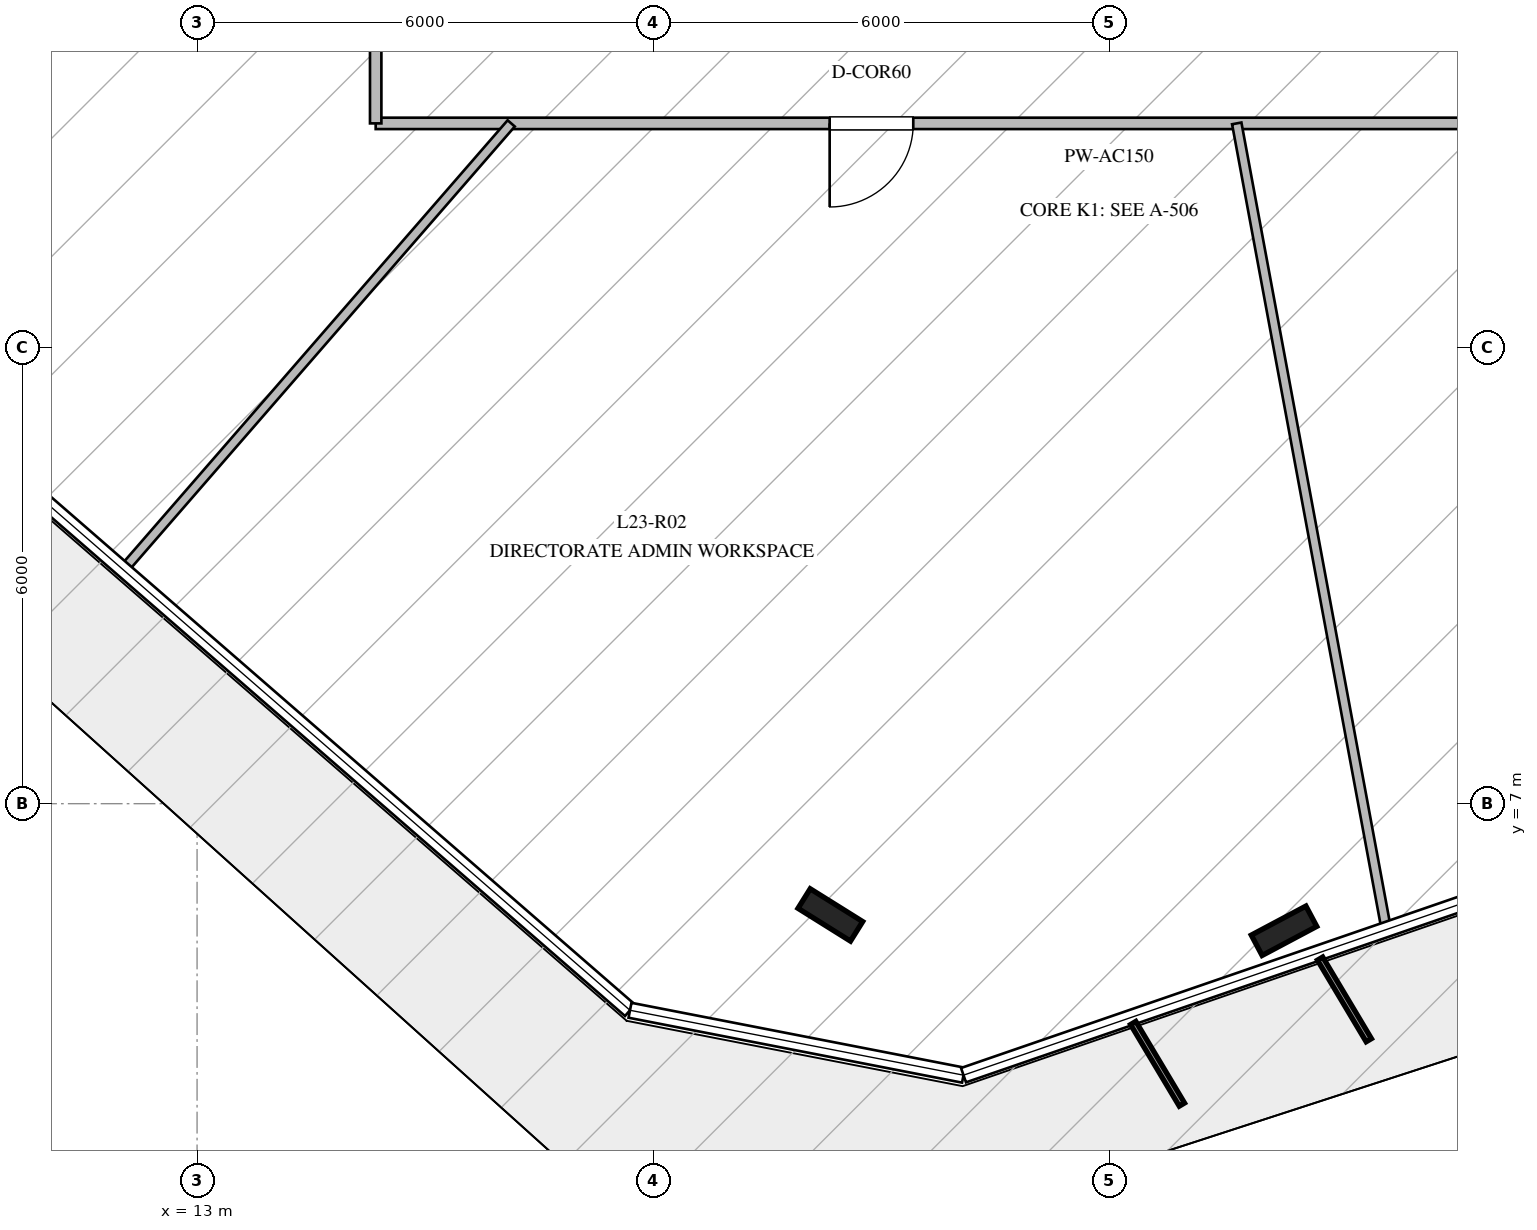
"""IFC4 building model, lengths in metres.
Left out: names, types, materials, properties, quantities, classifications, styles, units other than length and angle.
Written with IfcOpenShell. Run it as: python <this file> out.ifc"""

import sys

from ifc_helpers import new_model, si_unit, direction, frame, frame_2d, origin, origin_2d, place, context, subcontext, project, spatial, rectangle, i_section, extrude, element, fill, save


model = new_model("IFC4")
c1 = context("Model", 3, precision=1e-05, world=origin(), true_north=direction((0.0, 1.0)))
c2 = subcontext(c1, "Body", "Model", "MODEL_VIEW")
j1 = project(units=[si_unit("LENGTHUNIT", "METRE"), si_unit("PLANEANGLEUNIT", "RADIAN")], contexts=[c1])
p1 = place(None, origin())
s1 = spatial("IfcSite", under=j1, at=p1, CompositionType="ELEMENT")
p2 = place(p1, origin())
s2 = spatial("IfcBuilding", under=s1, at=p2, CompositionType="ELEMENT")
p3 = place(p2, frame((0.0, 0.0, 97.4)))
s3 = spatial("IfcBuildingStorey", under=s2, at=p3, CompositionType="ELEMENT", Elevation=97.4)
for number, where, z_axis, x_axis in (
    (1, (21.332, 5.536, -0.27), (0.0, 0.0, 1.0), (-0.848, 0.53, 0.0)),
    (2, (27.301, 5.328, -0.27), (0.0, 0.0, 1.0), (0.883, 0.469, 0.0)),
):
    element("IfcColumn", number, at=place(p3, frame(where, z_axis=z_axis, x_axis=x_axis)), inside=s3, PredefinedType="COLUMN", context=c2, shape_type="SweptSolid", body=[
        extrude(i_section(OverallWidth=0.303, OverallDepth=0.814, WebThickness=0.021, FlangeThickness=0.04, at=origin_2d()), origin(), (0.0, 0.0, 1.0), 5.27),
    ])
p4 = place(p3, frame((34.65, 15.95, 0.0), z_axis=(0.0, 0.0, 1.0), x_axis=(-1.0, 0.0, 0.0)))
e3 = element("IfcWall", 3, at=p4, inside=s3, PredefinedType="PARTITIONING", context=c2, shape_type="SweptSolid", body=[
    extrude(rectangle(XDim=19.3, YDim=0.15, at=frame_2d((9.65, 0.0))), origin(), (0.0, 0.0, 1.0), 4.21),
])
p5 = place(p4, frame((12.227, 0.0, 0.0)))
e4 = element("IfcOpeningElement", 4, at=p5, cuts=e3, PredefinedType="OPENING", context=c2, shape_type="SweptSolid", body=[
    extrude(rectangle(XDim=1.1, YDim=2.2, at=frame_2d((0.55, 1.1))), frame((0.0, 0.085, 0.0), z_axis=(0.0, -1.0, 0.0), x_axis=(1.0, 0.0, 0.0)), (0.0, 0.0, 1.0), 0.17),
])
p6 = place(p3, frame((15.35, 15.95, 0.0), z_axis=(0.0, 0.0, 1.0), x_axis=(0.0, 1.0, 0.0)))
e5 = element("IfcWall", 5, at=p6, inside=s3, PredefinedType="PARTITIONING", context=c2, shape_type="SweptSolid", body=[
    extrude(rectangle(XDim=18.1, YDim=0.15, at=frame_2d((9.05, 0.0))), origin(), (0.0, 0.0, 1.0), 4.21),
])
p7 = place(p6, frame((5.012, 0.0, 0.0)))
e6 = element("IfcOpeningElement", 6, at=p7, cuts=e5, PredefinedType="OPENING", context=c2, shape_type="SweptSolid", body=[
    extrude(rectangle(XDim=1.1, YDim=2.2, at=frame_2d((0.55, 1.1))), frame((0.0, 0.085, 0.0), z_axis=(0.0, -1.0, 0.0), x_axis=(1.0, 0.0, 0.0)), (0.0, 0.0, 1.0), 0.17),
])
p8 = place(p3, frame((17.133, 15.95, 0.0), z_axis=(0.0, 0.0, 1.0), x_axis=(-0.655994183005, -0.754765945088, 0.0)))
e7 = element("IfcWall", 7, at=p8, inside=s3, PredefinedType="PARTITIONING", context=c2, shape_type="SweptSolid", body=[
    extrude(rectangle(XDim=7.764, YDim=0.125, at=frame_2d((3.882, 0.0))), origin(), (0.0, 0.0, 1.0), 4.16),
])
p9 = place(p3, frame((26.679, 15.95, 0.0), z_axis=(0.0, 0.0, 1.0), x_axis=(0.182465094044, -0.983212331826, 0.0)))
e8 = element("IfcWall", 8, at=p9, inside=s3, PredefinedType="PARTITIONING", context=c2, shape_type="SweptSolid", body=[
    extrude(rectangle(XDim=10.77, YDim=0.125, at=frame_2d((5.385, 0.0))), origin(), (0.0, 0.0, 1.0), 4.16),
])
p10 = place(p5, origin())
e9 = element("IfcDoor", 9, at=p10, inside=s3, OperationType="SINGLE_SWING_RIGHT", PredefinedType="DOOR", context=c2, shape_type="SweptSolid", body=[
    extrude(rectangle(XDim=1.1, YDim=2.2, at=frame_2d((0.55, 1.1))), frame((0.0, 0.025, 0.0), z_axis=(0.0, -1.0, 0.0), x_axis=(1.0, 0.0, 0.0)), (0.0, 0.0, 1.0), 0.05),
])
fill(e4, e9)
save(model, sys.argv[1])
